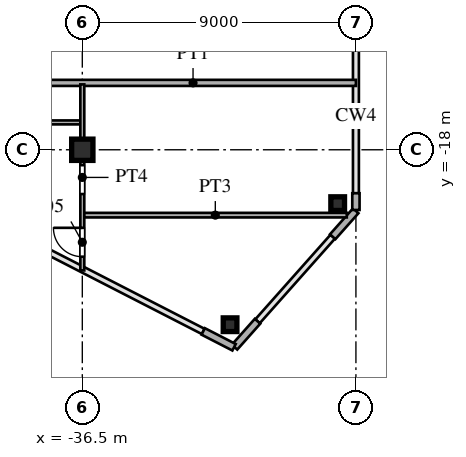
"""IFC4 building model, lengths in metres.
Left out: names, types, materials, properties, quantities, classifications, styles, units other than length and angle.
Written with IfcOpenShell. Run it as: python <this file> out.ifc"""

import sys

from ifc_helpers import new_model, si_unit, direction, frame, frame_2d, origin, origin_2d, place, context, subcontext, project, spatial, rectangle, hollow_rectangle, i_section, extrude, source, transform, mapped, element, fill, save


model = new_model("IFC4")
c1 = context("Model", 3, precision=1e-05, world=origin(), true_north=direction((0.0, 1.0)))
c2 = subcontext(c1, "Body", "Model", "MODEL_VIEW")
j1 = project(units=[si_unit("LENGTHUNIT", "METRE"), si_unit("PLANEANGLEUNIT", "RADIAN")], contexts=[c1])
p1 = place(None, origin())
s1 = spatial("IfcSite", under=j1, at=p1, CompositionType="ELEMENT")
p2 = place(p1, origin())
s2 = spatial("IfcBuilding", under=s1, at=p2, CompositionType="ELEMENT")
p3 = place(p2, frame((0.0, 0.0, 140.4)))
s3 = spatial("IfcBuildingStorey", under=s2, at=p3, CompositionType="ELEMENT", Elevation=140.4)
m1 = source(origin(), c2, "Body", "SweptSolid", [
    extrude(i_section(OverallWidth=0.7, OverallDepth=0.7, WebThickness=0.028, FlangeThickness=0.045, at=origin_2d()), origin(), (0.0, 0.0, 1.0), 3.6),
])
p4 = place(p3, frame((-36.5, -18.0, 0.0), z_axis=(0.0, 0.0, 1.0), x_axis=(1.0, 0.0, 0.0)))
e1 = element("IfcColumn", 1, at=p4, inside=s3, PredefinedType="COLUMN", context=c2, shape_type="MappedRepresentation", body=[
    mapped(m1, transform((0.0, 0.0, 0.0), scale=1.0)),
])
m2 = source(origin(), c2, "Body", "SweptSolid", [
    extrude(hollow_rectangle(XDim=0.45, YDim=0.45, WallThickness=0.018, at=origin_2d()), origin(), (0.0, 0.0, 1.0), 3.6),
])
for number, where, z_axis, x_axis in (
    (2, (-28.1, -19.772, 0.0), (0.0, 0.0, 1.0), (1.0, 0.0, 0.0)),
    (3, (-31.64, -23.754, 0.0), (0.0, 0.0, 1.0), (1.0, 0.0, 0.0)),
):
    element("IfcColumn", number, at=place(p3, frame(where, z_axis=z_axis, x_axis=x_axis)), inside=s3, PredefinedType="COLUMN", context=c2, shape_type="MappedRepresentation", body=[
        mapped(m2, transform((0.0, 0.0, 0.0), scale=1.0)),
    ])
p5 = place(p3, frame((-27.5, -19.98, 0.0), z_axis=(0.0, 0.0, 1.0), x_axis=(0.0, 1.0, 0.0)))
e4 = element("IfcWall", 4, at=p5, inside=s3, PredefinedType="SOLIDWALL", context=c2, shape_type="SweptSolid", body=[
    extrude(rectangle(XDim=0.55, YDim=0.24, at=frame_2d((0.275, 0.0))), origin(), (0.0, 0.0, 1.0), 3.38),
])
p6 = place(p3, frame((-32.523, -23.975, 0.0), z_axis=(0.0, 0.0, 1.0), x_axis=(0.889797395748, -0.456355776255, 0.0)))
e5 = element("IfcWall", 5, at=p6, inside=s3, PredefinedType="SOLIDWALL", context=c2, shape_type="SweptSolid", body=[
    extrude(rectangle(XDim=1.14, YDim=0.24, at=frame_2d((0.57, 0.0))), origin(), (0.0, 0.0, 1.0), 3.38),
])
for number, where, z_axis, x_axis in (
    (6, (-31.493, -24.492, 0.0), (0.0, 0.0, 1.0), (0.664, 0.747, 0.0)),
    (7, (-28.264, -20.86, 0.0), (0.0, 0.0, 1.0), (0.664, 0.747, 0.0)),
):
    element("IfcWall", number, at=place(p3, frame(where, z_axis=z_axis, x_axis=x_axis)), inside=s3, PredefinedType="SOLIDWALL", context=c2, shape_type="SweptSolid", body=[
        extrude(rectangle(XDim=1.14, YDim=0.24, at=frame_2d((0.57, 0.0))), origin(), (0.0, 0.0, 1.0), 3.38),
    ])
p7 = place(p3, frame((-36.45, -20.15, 0.0), z_axis=(0.0, 0.0, 1.0), x_axis=(1.0, 0.0, 0.0)))
e8 = element("IfcWall", 8, at=p7, inside=s3, PredefinedType="PARTITIONING", context=c2, shape_type="SweptSolid", body=[
    extrude(rectangle(XDim=8.649, YDim=0.15, at=frame_2d((4.325, 0.0))), origin(), (0.0, 0.0, 1.0), 3.38),
])
p8 = place(p3, frame((-41.0, -17.1, 0.0), z_axis=(0.0, 0.0, 1.0), x_axis=(1.0, 0.0, 0.0)))
e9 = element("IfcWall", 9, at=p8, inside=s3, PredefinedType="PARTITIONING", context=c2, shape_type="SweptSolid", body=[
    extrude(rectangle(XDim=4.45, YDim=0.13, at=frame_2d((2.225, 0.0))), origin(), (0.0, 0.0, 1.0), 3.38),
])
p9 = place(p3, frame((-38.215, -15.8, 0.0), z_axis=(0.0, 0.0, 1.0), x_axis=(1.0, 0.0, 0.0)))
e10 = element("IfcWall", 10, at=p9, inside=s3, PredefinedType="PARTITIONING", context=c2, shape_type="SweptSolid", body=[
    extrude(rectangle(XDim=10.715, YDim=0.2, at=frame_2d((5.357, 0.0))), origin(), (0.0, 0.0, 1.0), 3.38),
])
p10 = place(p3, frame((-36.5, -21.969, 0.0), z_axis=(0.0, 0.0, 1.0), x_axis=(0.0, 1.0, 0.0)))
e11 = element("IfcWall", 11, at=p10, inside=s3, PredefinedType="PARTITIONING", context=c2, shape_type="SweptSolid", body=[
    extrude(rectangle(XDim=6.119, YDim=0.13, at=frame_2d((3.06, 0.0))), origin(), (0.0, 0.0, 1.0), 2.78),
])
p11 = place(p10, frame((0.452, 0.0, 0.0)))
e12 = element("IfcOpeningElement", 12, at=p11, cuts=e11, PredefinedType="OPENING", context=c2, shape_type="SweptSolid", body=[
    extrude(rectangle(XDim=0.95, YDim=2.15, at=frame_2d((0.475, 1.075))), frame((0.0, 0.075, 0.0), z_axis=(0.0, -1.0, 0.0), x_axis=(1.0, 0.0, 0.0)), (0.0, 0.0, 1.0), 0.15),
])
p12 = place(p10, frame((2.513, 0.0, 0.0)))
e13 = element("IfcOpeningElement", 13, at=p12, cuts=e11, PredefinedType="OPENING", context=c2, shape_type="SweptSolid", body=[
    extrude(rectangle(XDim=0.95, YDim=2.15, at=frame_2d((0.475, 1.075))), frame((0.0, 0.075, 0.0), z_axis=(0.0, -1.0, 0.0), x_axis=(1.0, 0.0, 0.0)), (0.0, 0.0, 1.0), 0.15),
])
m3 = source(origin(), c2, "Body", "SweptSolid", [
    extrude(rectangle(XDim=0.95, YDim=2.15, at=frame_2d((0.475, 1.075))), frame((0.0, 0.025, 0.0), z_axis=(0.0, -1.0, 0.0), x_axis=(1.0, 0.0, 0.0)), (0.0, 0.0, 1.0), 0.05),
])
p13 = place(p11, origin())
e14 = element("IfcDoor", 14, at=p13, inside=s3, OperationType="SINGLE_SWING_RIGHT", PredefinedType="DOOR", context=c2, shape_type="MappedRepresentation", body=[
    mapped(m3, transform((0.0, 0.0, 0.0), scale=1.0)),
])
fill(e12, e14)
save(model, sys.argv[1])
